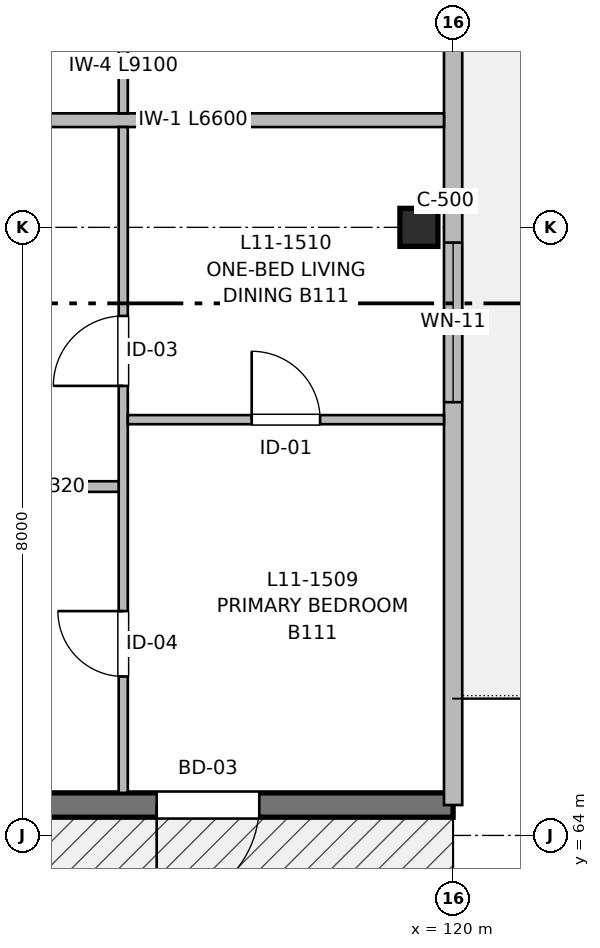
"""IFC4 building model, lengths in metres.
Left out: names, types, materials, properties, quantities, classifications, styles, units other than length and angle.
Written with IfcOpenShell. Run it as: python <this file> out.ifc"""

import sys

from ifc_helpers import new_model, si_unit, direction, frame, frame_2d, origin, origin_2d, place, context, subcontext, project, spatial, rectangle, extrude, element, fill, save


model = new_model("IFC4")
c1 = context("Model", 3, precision=1e-05, world=origin(), true_north=direction((0.0, 1.0)))
c2 = subcontext(c1, "Body", "Model", "MODEL_VIEW")
j1 = project(units=[si_unit("LENGTHUNIT", "METRE"), si_unit("PLANEANGLEUNIT", "RADIAN")], contexts=[c1])
p1 = place(None, origin())
s1 = spatial("IfcSite", under=j1, at=p1, CompositionType="ELEMENT")
p2 = place(p1, origin())
s2 = spatial("IfcBuilding", under=s1, at=p2, CompositionType="ELEMENT")
p3 = place(p2, frame((0.0, 0.0, 36.16)))
s3 = spatial("IfcBuildingStorey", under=s2, at=p3, CompositionType="ELEMENT", Elevation=36.16)
p4 = place(p3, frame((119.55, 72.0, 0.0), z_axis=(0.0, 0.0, 1.0), x_axis=(1.0, 0.0, 0.0)))
e1 = element("IfcColumn", 1, at=p4, inside=s3, PredefinedType="COLUMN", context=c2, shape_type="SweptSolid", body=[
    extrude(rectangle(XDim=0.5, YDim=0.5, at=origin_2d()), origin(), (0.0, 0.0, 1.0), 3.2),
])
p5 = place(p3, frame((120.0, 64.4, 0.0), z_axis=(0.0, 0.0, 1.0), x_axis=(-1.0, 0.0, 0.0)))
e2 = element("IfcWall", 2, at=p5, inside=s3, PredefinedType="SHEAR", context=c2, shape_type="SweptSolid", body=[
    extrude(rectangle(XDim=16.0, YDim=0.32, at=frame_2d((8.0, 0.0))), origin(), (0.0, 0.0, 1.0), 2.98),
])
p6 = place(p5, frame((2.55, 0.0, 0.0)))
e3 = element("IfcOpeningElement", 3, at=p6, cuts=e2, PredefinedType="OPENING", context=c2, shape_type="SweptSolid", body=[
    extrude(rectangle(XDim=1.35, YDim=2.2, at=frame_2d((0.675, 1.1))), frame((0.0, 0.17, 0.0), z_axis=(0.0, -1.0, 0.0), x_axis=(1.0, 0.0, 0.0)), (0.0, 0.0, 1.0), 0.34),
])
p7 = place(p5, frame((10.95, 0.0, 0.67)))
e4 = element("IfcOpeningElement", 4, at=p7, cuts=e2, PredefinedType="OPENING", context=c2, shape_type="SweptSolid", body=[
    extrude(rectangle(XDim=2.1, YDim=1.55, at=frame_2d((1.05, 0.775))), frame((0.0, 0.17, 0.0), z_axis=(0.0, -1.0, 0.0), x_axis=(1.0, 0.0, 0.0)), (0.0, 0.0, 1.0), 0.34),
])
p8 = place(p3, frame((120.0, 88.0, 0.0), z_axis=(0.0, 0.0, 1.0), x_axis=(0.0, -1.0, 0.0)))
e5 = element("IfcWall", 5, at=p8, inside=s3, PredefinedType="SOLIDWALL", context=c2, shape_type="SweptSolid", body=[
    extrude(rectangle(XDim=23.6, YDim=0.24, at=frame_2d((11.8, 0.0))), origin(), (0.0, 0.0, 1.0), 2.98),
])
p9 = place(p8, frame((5.75, 0.0, 0.0)))
e6 = element("IfcOpeningElement", 6, at=p9, cuts=e5, PredefinedType="OPENING", context=c2, shape_type="SweptSolid", body=[
    extrude(rectangle(XDim=1.2, YDim=2.2, at=frame_2d((0.6, 1.1))), frame((0.0, 0.13, 0.0), z_axis=(0.0, -1.0, 0.0), x_axis=(1.0, 0.0, 0.0)), (0.0, 0.0, 1.0), 0.26),
])
p10 = place(p8, frame((7.2, 0.0, 0.72)))
e7 = element("IfcOpeningElement", 7, at=p10, cuts=e5, PredefinedType="OPENING", context=c2, shape_type="SweptSolid", body=[
    extrude(rectangle(XDim=2.0, YDim=1.5, at=frame_2d((1.0, 0.75))), frame((0.0, 0.13, 0.0), z_axis=(0.0, -1.0, 0.0), x_axis=(1.0, 0.0, 0.0)), (0.0, 0.0, 1.0), 0.26),
])
p11 = place(p8, frame((16.2, 0.0, 0.67)))
e8 = element("IfcOpeningElement", 8, at=p11, cuts=e5, PredefinedType="OPENING", context=c2, shape_type="SweptSolid", body=[
    extrude(rectangle(XDim=2.1, YDim=1.55, at=frame_2d((1.05, 0.775))), frame((0.0, 0.13, 0.0), z_axis=(0.0, -1.0, 0.0), x_axis=(1.0, 0.0, 0.0)), (0.0, 0.0, 1.0), 0.26),
])
p12 = place(p8, frame((11.225, 0.0, 0.82)))
e9 = element("IfcOpeningElement", 9, at=p12, cuts=e5, PredefinedType="OPENING", context=c2, shape_type="SweptSolid", body=[
    extrude(rectangle(XDim=1.5, YDim=1.4, at=frame_2d((0.75, 0.7))), frame((0.0, 0.13, 0.0), z_axis=(0.0, -1.0, 0.0), x_axis=(1.0, 0.0, 0.0)), (0.0, 0.0, 1.0), 0.26),
])
p13 = place(p8, frame((1.95, 0.0, 0.82)))
e10 = element("IfcOpeningElement", 10, at=p13, cuts=e5, PredefinedType="OPENING", context=c2, shape_type="SweptSolid", body=[
    extrude(rectangle(XDim=1.5, YDim=1.4, at=frame_2d((0.75, 0.7))), frame((0.0, 0.13, 0.0), z_axis=(0.0, -1.0, 0.0), x_axis=(1.0, 0.0, 0.0)), (0.0, 0.0, 1.0), 0.26),
])
p14 = place(p3, frame((113.28, 73.41, 0.0), z_axis=(0.0, 0.0, 1.0), x_axis=(1.0, 0.0, 0.0)))
e11 = element("IfcWall", 11, at=p14, inside=s3, PredefinedType="PARTITIONING", context=c2, shape_type="SweptSolid", body=[
    extrude(rectangle(XDim=6.6, YDim=0.18, at=frame_2d((3.3, 0.0))), origin(), (0.0, 0.0, 1.0), 2.935),
])
p15 = place(p3, frame((115.66, 64.56, 0.0), z_axis=(0.0, 0.0, 1.0), x_axis=(0.0, 1.0, 0.0)))
e12 = element("IfcWall", 12, at=p15, inside=s3, PredefinedType="PARTITIONING", context=c2, shape_type="SweptSolid", body=[
    extrude(rectangle(XDim=8.76, YDim=0.12, at=frame_2d((4.38, 0.0))), origin(), (0.0, 0.0, 1.0), 2.935),
])
p16 = place(p15, frame((1.531, 0.0, 0.0)))
e13 = element("IfcOpeningElement", 13, at=p16, cuts=e12, PredefinedType="OPENING", context=c2, shape_type="SweptSolid", body=[
    extrude(rectangle(XDim=0.86, YDim=2.1, at=frame_2d((0.43, 1.05))), frame((0.0, 0.07, 0.0), z_axis=(0.0, -1.0, 0.0), x_axis=(1.0, 0.0, 0.0)), (0.0, 0.0, 1.0), 0.14),
])
p17 = place(p15, frame((5.354, 0.0, 0.0)))
e14 = element("IfcOpeningElement", 14, at=p17, cuts=e12, PredefinedType="OPENING", context=c2, shape_type="SweptSolid", body=[
    extrude(rectangle(XDim=0.92, YDim=2.1, at=frame_2d((0.46, 1.05))), frame((0.0, 0.07, 0.0), z_axis=(0.0, -1.0, 0.0), x_axis=(1.0, 0.0, 0.0)), (0.0, 0.0, 1.0), 0.14),
])
p18 = place(p3, frame((113.28, 68.59, 0.0), z_axis=(0.0, 0.0, 1.0), x_axis=(1.0, 0.0, 0.0)))
e15 = element("IfcWall", 15, at=p18, inside=s3, PredefinedType="PARTITIONING", context=c2, shape_type="SweptSolid", body=[
    extrude(rectangle(XDim=2.32, YDim=0.14, at=frame_2d((1.16, 0.0))), origin(), (0.0, 0.0, 1.0), 2.935),
])
p19 = place(p3, frame((115.72, 69.47, 0.0), z_axis=(0.0, 0.0, 1.0), x_axis=(1.0, 0.0, 0.0)))
e16 = element("IfcWall", 16, at=p19, inside=s3, PredefinedType="PARTITIONING", context=c2, shape_type="SweptSolid", body=[
    extrude(rectangle(XDim=4.16, YDim=0.12, at=frame_2d((2.08, 0.0))), origin(), (0.0, 0.0, 1.0), 2.935),
])
p20 = place(p19, frame((1.63, 0.0, 0.0)))
e17 = element("IfcOpeningElement", 17, at=p20, cuts=e16, PredefinedType="OPENING", context=c2, shape_type="SweptSolid", body=[
    extrude(rectangle(XDim=0.9, YDim=2.1, at=frame_2d((0.45, 1.05))), frame((0.0, 0.07, 0.0), z_axis=(0.0, -1.0, 0.0), x_axis=(1.0, 0.0, 0.0)), (0.0, 0.0, 1.0), 0.14),
])
p21 = place(p3, frame((115.66, 73.5, 0.0), z_axis=(0.0, 0.0, 1.0), x_axis=(0.0, 1.0, 0.0)))
e18 = element("IfcWall", 18, at=p21, inside=s3, PredefinedType="PARTITIONING", context=c2, shape_type="SweptSolid", body=[
    extrude(rectangle(XDim=9.1, YDim=0.12, at=frame_2d((4.55, 0.0))), origin(), (0.0, 0.0, 1.0), 2.935),
])
p22 = place(p21, frame((1.592, 0.0, 0.0)))
e19 = element("IfcOpeningElement", 19, at=p22, cuts=e18, PredefinedType="OPENING", context=c2, shape_type="SweptSolid", body=[
    extrude(rectangle(XDim=0.94, YDim=2.1, at=frame_2d((0.47, 1.05))), frame((0.0, 0.07, 0.0), z_axis=(0.0, -1.0, 0.0), x_axis=(1.0, 0.0, 0.0)), (0.0, 0.0, 1.0), 0.14),
])
p23 = place(p21, frame((5.565, 0.0, 0.0)))
e20 = element("IfcOpeningElement", 20, at=p23, cuts=e18, PredefinedType="OPENING", context=c2, shape_type="SweptSolid", body=[
    extrude(rectangle(XDim=0.92, YDim=2.1, at=frame_2d((0.46, 1.05))), frame((0.0, 0.07, 0.0), z_axis=(0.0, -1.0, 0.0), x_axis=(1.0, 0.0, 0.0)), (0.0, 0.0, 1.0), 0.14),
])
p24 = place(p6, origin())
e21 = element("IfcDoor", 21, at=p24, inside=s3, OperationType="SINGLE_SWING_RIGHT", PredefinedType="DOOR", context=c2, shape_type="SweptSolid", body=[
    extrude(rectangle(XDim=1.35, YDim=2.2, at=frame_2d((0.675, 1.1))), frame((0.0, 0.025, 0.0), z_axis=(0.0, -1.0, 0.0), x_axis=(1.0, 0.0, 0.0)), (0.0, 0.0, 1.0), 0.05),
])
fill(e3, e21)
p25 = place(p11, origin())
e22 = element("IfcWindow", 22, at=p25, inside=s3, PartitioningType="SINGLE_PANEL", PredefinedType="WINDOW", context=c2, shape_type="SweptSolid", body=[
    extrude(rectangle(XDim=2.1, YDim=1.55, at=frame_2d((1.05, 0.775))), frame((0.0, 0.03, 0.0), z_axis=(0.0, -1.0, 0.0), x_axis=(1.0, 0.0, 0.0)), (0.0, 0.0, 1.0), 0.06),
])
fill(e8, e22)
p26 = place(p16, origin())
e23 = element("IfcDoor", 23, at=p26, inside=s3, OperationType="SINGLE_SWING_RIGHT", PredefinedType="DOOR", context=c2, shape_type="SweptSolid", body=[
    extrude(rectangle(XDim=0.86, YDim=2.1, at=frame_2d((0.43, 1.05))), frame((0.0, 0.025, 0.0), z_axis=(0.0, -1.0, 0.0), x_axis=(1.0, 0.0, 0.0)), (0.0, 0.0, 1.0), 0.05),
])
fill(e13, e23)
p27 = place(p17, origin())
e24 = element("IfcDoor", 24, at=p27, inside=s3, OperationType="SINGLE_SWING_LEFT", PredefinedType="DOOR", context=c2, shape_type="SweptSolid", body=[
    extrude(rectangle(XDim=0.92, YDim=2.1, at=frame_2d((0.46, 1.05))), frame((0.0, 0.025, 0.0), z_axis=(0.0, -1.0, 0.0), x_axis=(1.0, 0.0, 0.0)), (0.0, 0.0, 1.0), 0.05),
])
fill(e14, e24)
p28 = place(p20, origin())
e25 = element("IfcDoor", 25, at=p28, inside=s3, OperationType="SINGLE_SWING_LEFT", PredefinedType="DOOR", context=c2, shape_type="SweptSolid", body=[
    extrude(rectangle(XDim=0.9, YDim=2.1, at=frame_2d((0.45, 1.05))), frame((0.0, 0.025, 0.0), z_axis=(0.0, -1.0, 0.0), x_axis=(1.0, 0.0, 0.0)), (0.0, 0.0, 1.0), 0.05),
])
fill(e17, e25)
save(model, sys.argv[1])
